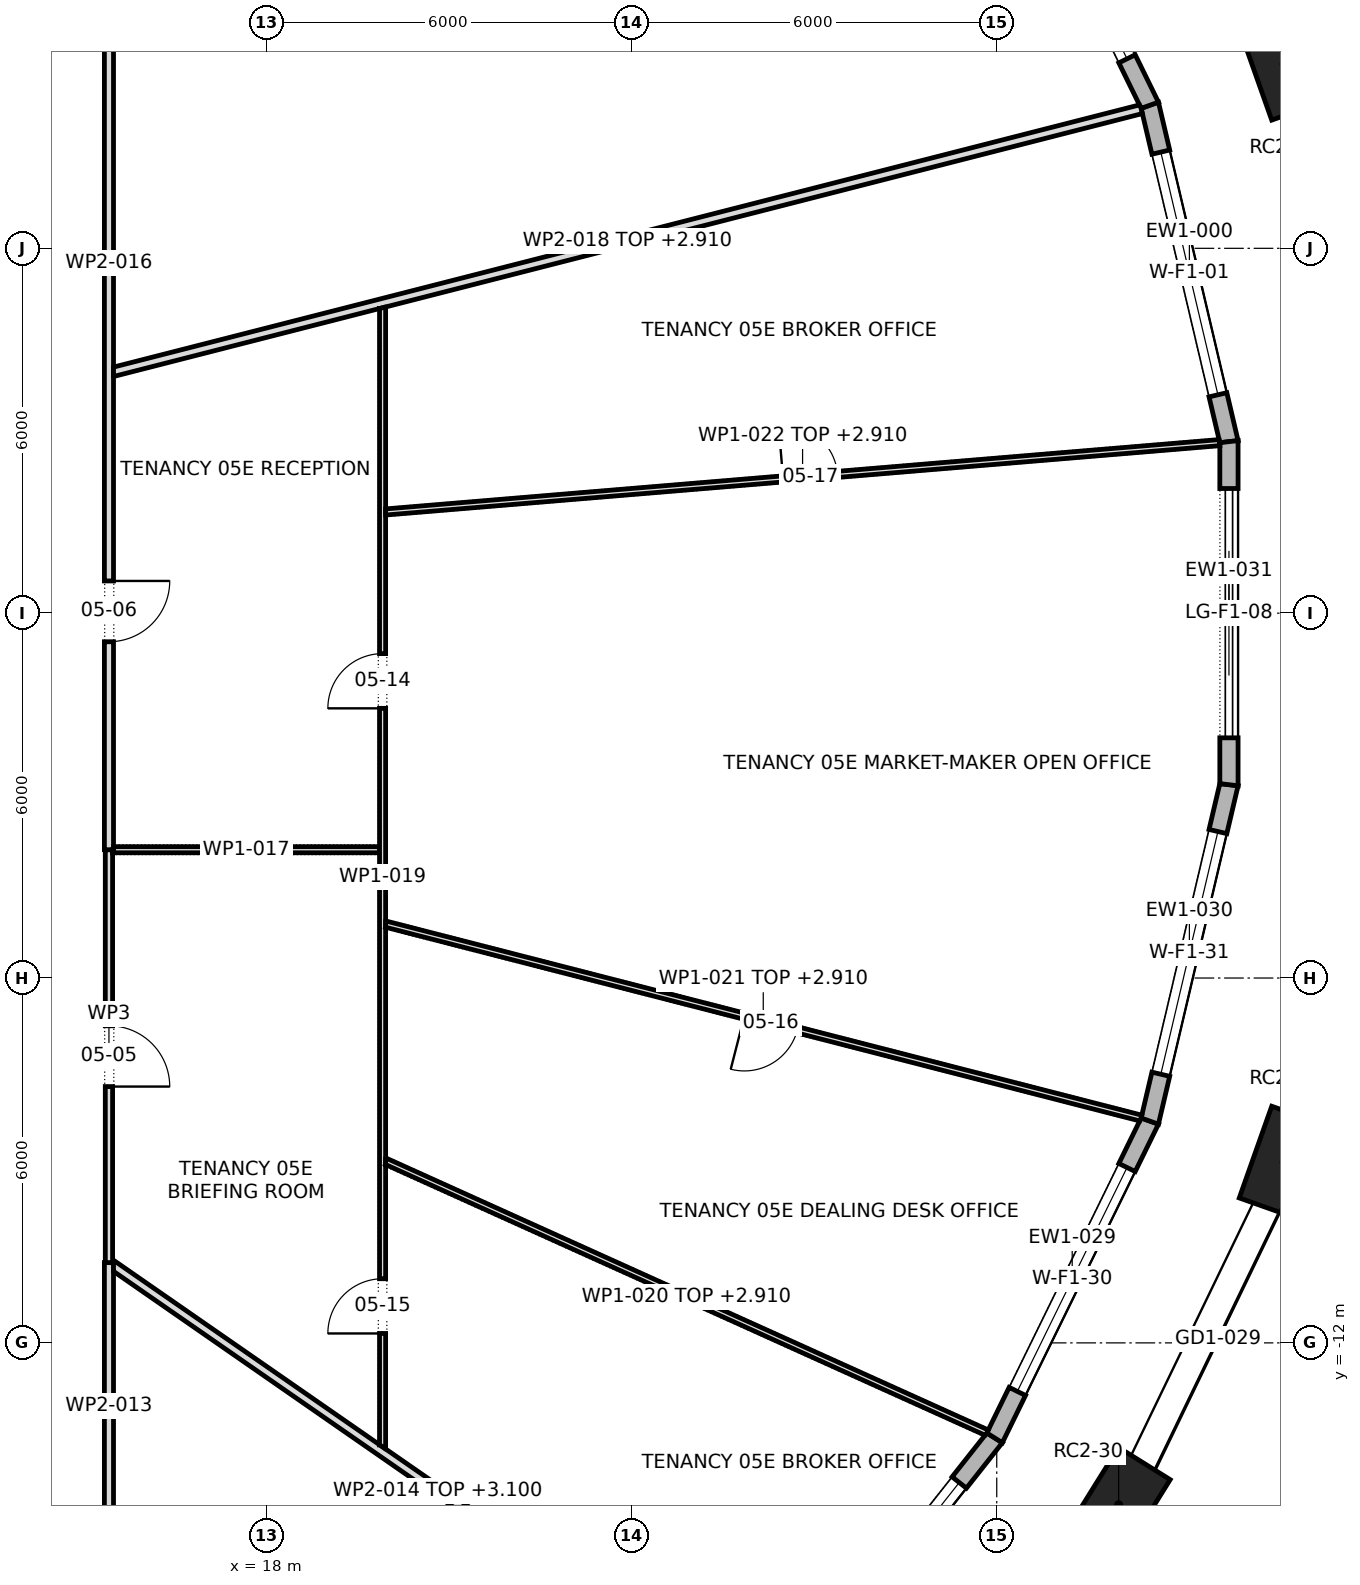
"""IFC4 building model, lengths in metres.
Left out: names, types, materials, properties, quantities, classifications, styles, units other than length and angle.
Written with IfcOpenShell. Run it as: python <this file> out.ifc"""

import sys

from ifc_helpers import new_model, si_unit, direction, frame, frame_2d, origin, origin_2d, place, context, subcontext, project, spatial, polyline, rectangle, outline, extrude, element, fill, save


model = new_model("IFC4")
c1 = context("Model", 3, precision=1e-05, world=origin(), true_north=direction((0.0, 1.0)))
c2 = subcontext(c1, "Body", "Model", "MODEL_VIEW")
j1 = project(units=[si_unit("LENGTHUNIT", "METRE"), si_unit("PLANEANGLEUNIT", "RADIAN")], contexts=[c1])
p1 = place(None, origin())
s1 = spatial("IfcSite", under=j1, at=p1, CompositionType="ELEMENT")
p2 = place(p1, origin())
s2 = spatial("IfcBuilding", under=s1, at=p2, CompositionType="ELEMENT")
p3 = place(p2, frame((0.0, 0.0, 82.3)))
s3 = spatial("IfcBuildingStorey", under=s2, at=p3, CompositionType="ELEMENT", Elevation=82.3)
for number, where, z_axis, x_axis in (
    (1, (34.727, 9.029, 0.0), (0.0, 0.0, 1.0), (-0.334, 0.943, 0.0)),
    (2, (32.004, -14.663, 0.0), (0.0, 0.0, 1.0), (0.529, 0.849, 0.0)),
    (3, (34.727, -9.029, 0.0), (0.0, 0.0, 1.0), (0.334, 0.943, 0.0)),
):
    element("IfcColumn", number, at=place(p3, frame(where, z_axis=z_axis, x_axis=x_axis)), inside=s3, PredefinedType="COLUMN", context=c2, shape_type="SweptSolid", body=[
        extrude(rectangle(XDim=1.6, YDim=1.0, at=origin_2d()), origin(), (0.0, 0.0, 1.0), 4.2),
    ])
p4 = place(p3, frame((33.819, 2.821, 0.0), z_axis=(0.0, 0.0, 1.0), x_axis=(-0.229058489262, 0.97341266095, 0.0)))
e4 = element("IfcWall", 4, at=p4, inside=s3, PredefinedType="STANDARD", context=c2, shape_type="SweptSolid", body=[
    extrude(outline(polyline([(-0.017, -0.15), (5.7, -0.15), (5.666, 0.15), (0.017, 0.15), (-0.017, -0.15)])), origin(), (0.0, 0.0, 1.0), 3.9),
])
p5 = place(p4, frame((0.792, 0.0, 0.6)))
e5 = element("IfcOpeningElement", 5, at=p5, cuts=e4, PredefinedType="OPENING", context=c2, shape_type="SweptSolid", body=[
    extrude(rectangle(XDim=4.1, YDim=2.85, at=frame_2d((2.05, 1.425))), frame((0.0, 0.162, 0.0), z_axis=(0.0, -1.0, 0.0), x_axis=(1.0, 0.0, 0.0)), (0.0, 0.0, 1.0), 0.324),
])
p6 = place(p3, frame((32.517, 8.353, 0.0), z_axis=(0.0, 0.0, 1.0), x_axis=(-0.440027465772, 0.897984314655, 0.0)))
e6 = element("IfcWall", 6, at=p6, inside=s3, PredefinedType="STANDARD", context=c2, shape_type="SweptSolid", body=[
    extrude(outline(polyline([(-0.017, -0.15), (5.817, -0.15), (5.785, 0.15), (0.017, 0.15), (-0.017, -0.15)])), origin(), (0.0, 0.0, 1.0), 3.9),
])
p7 = place(p6, frame((0.85, 0.0, 0.6)))
e7 = element("IfcOpeningElement", 7, at=p7, cuts=e6, PredefinedType="OPENING", context=c2, shape_type="SweptSolid", body=[
    extrude(rectangle(XDim=4.1, YDim=2.85, at=frame_2d((2.05, 1.425))), frame((0.0, 0.162, 0.0), z_axis=(0.0, -1.0, 0.0), x_axis=(1.0, 0.0, 0.0)), (0.0, 0.0, 1.0), 0.324),
])
p8 = place(p3, frame((26.26, -18.248, 0.0), z_axis=(0.0, 0.0, 1.0), x_axis=(0.620093447965, 0.784527957303, 0.0)))
e8 = element("IfcWall", 8, at=p8, inside=s3, PredefinedType="STANDARD", context=c2, shape_type="SweptSolid", body=[
    extrude(outline(polyline([(-0.015, -0.15), (5.989, -0.15), (5.957, 0.15), (0.015, 0.15), (-0.015, -0.15)])), origin(), (0.0, 0.0, 1.0), 3.9),
])
p9 = place(p8, frame((0.937, 0.0, 0.6)))
e9 = element("IfcOpeningElement", 9, at=p9, cuts=e8, PredefinedType="OPENING", context=c2, shape_type="SweptSolid", body=[
    extrude(rectangle(XDim=4.1, YDim=2.85, at=frame_2d((2.05, 1.425))), frame((0.0, 0.162, 0.0), z_axis=(0.0, -1.0, 0.0), x_axis=(1.0, 0.0, 0.0)), (0.0, 0.0, 1.0), 0.324),
])
p10 = place(p3, frame((29.964, -13.562, 0.0), z_axis=(0.0, 0.0, 1.0), x_axis=(0.440027465772, 0.897984314655, 0.0)))
e10 = element("IfcWall", 10, at=p10, inside=s3, PredefinedType="STANDARD", context=c2, shape_type="SweptSolid", body=[
    extrude(outline(polyline([(-0.016, -0.15), (5.818, -0.15), (5.784, 0.15), (0.016, 0.15), (-0.016, -0.15)])), origin(), (0.0, 0.0, 1.0), 3.9),
])
p11 = place(p10, frame((0.85, 0.0, 0.6)))
e11 = element("IfcOpeningElement", 11, at=p11, cuts=e10, PredefinedType="OPENING", context=c2, shape_type="SweptSolid", body=[
    extrude(rectangle(XDim=4.1, YDim=2.85, at=frame_2d((2.05, 1.425))), frame((0.0, 0.162, 0.0), z_axis=(0.0, -1.0, 0.0), x_axis=(1.0, 0.0, 0.0)), (0.0, 0.0, 1.0), 0.324),
])
p12 = place(p3, frame((32.517, -8.353, 0.0), z_axis=(0.0, 0.0, 1.0), x_axis=(0.229058489262, 0.97341266095, 0.0)))
e12 = element("IfcWall", 12, at=p12, inside=s3, PredefinedType="STANDARD", context=c2, shape_type="SweptSolid", body=[
    extrude(outline(polyline([(-0.017, -0.15), (5.7, -0.15), (5.666, 0.15), (0.017, 0.15), (-0.017, -0.15)])), origin(), (0.0, 0.0, 1.0), 3.9),
])
p13 = place(p12, frame((0.792, 0.0, 0.6)))
e13 = element("IfcOpeningElement", 13, at=p13, cuts=e12, PredefinedType="OPENING", context=c2, shape_type="SweptSolid", body=[
    extrude(rectangle(XDim=4.1, YDim=2.85, at=frame_2d((2.05, 1.425))), frame((0.0, 0.162, 0.0), z_axis=(0.0, -1.0, 0.0), x_axis=(1.0, 0.0, 0.0)), (0.0, 0.0, 1.0), 0.324),
])
p14 = place(p3, frame((33.819, -2.821, 0.0), z_axis=(0.0, 0.0, 1.0), x_axis=(0.0, 1.0, 0.0)))
e14 = element("IfcWall", 14, at=p14, inside=s3, PredefinedType="STANDARD", context=c2, shape_type="SweptSolid", body=[
    extrude(outline(polyline([(-0.017, -0.15), (5.658, -0.15), (5.624, 0.15), (0.017, 0.15), (-0.017, -0.15)])), origin(), (0.0, 0.0, 1.0), 3.9),
])
p15 = place(p14, frame((0.771, 0.0, 0.0)))
e15 = element("IfcOpeningElement", 15, at=p15, cuts=e14, PredefinedType="OPENING", context=c2, shape_type="SweptSolid", body=[
    extrude(rectangle(XDim=4.1, YDim=3.45, at=frame_2d((2.05, 1.725))), frame((0.0, 0.162, 0.0), z_axis=(0.0, -1.0, 0.0), x_axis=(1.0, 0.0, 0.0)), (0.0, 0.0, 1.0), 0.324),
])
p16 = place(p3, frame((15.4, -10.68, 0.0), z_axis=(0.0, 0.0, 1.0), x_axis=(0.0, -1.0, 0.0)))
e16 = element("IfcWall", 16, at=p16, inside=s3, PredefinedType="PARTITIONING", context=c2, shape_type="SweptSolid", body=[
    extrude(outline(polyline([(0.0, -0.075), (1.548, -0.075), (3.097, -0.075), (4.645, -0.075), (4.795, 0.075), (3.197, 0.075), (1.598, 0.075), (0.0, 0.075), (0.0, -0.075)])), origin(), (0.0, 0.0, 1.0), 3.9),
])
p17 = place(p3, frame((15.418, -10.692, 0.0), z_axis=(0.0, 0.0, 1.0), x_axis=(0.821683258501, -0.569944403166, 0.0)))
e17 = element("IfcWall", 17, at=p17, inside=s3, PredefinedType="PARTITIONING", context=c2, shape_type="SweptSolid", body=[
    extrude(outline(polyline([(13.047, 0.075), (11.122, 0.075), (9.196, 0.075), (7.271, 0.075), (5.346, 0.075), (5.343, 0.073), (5.342, 0.075), (3.562, 0.075), (1.781, 0.075), (0.0, 0.075), (0.0, 0.074), (0.028, 0.034), (0.04, 0.043), (0.122, -0.075), (1.968, -0.075), (3.815, -0.075), (5.661, -0.075), (7.508, -0.075), (9.354, -0.075), (11.2, -0.075), (13.047, -0.075), (13.047, 0.075)])), origin(), (0.0, 0.0, 1.0), 3.1),
])
p18 = place(p3, frame((15.4, -3.89, 0.0), z_axis=(0.0, 0.0, 1.0), x_axis=(0.0, -1.0, 0.0)))
e18 = element("IfcWall", 18, at=p18, inside=s3, PredefinedType="PARTITIONING", context=c2, shape_type="SweptSolid", body=[
    extrude(rectangle(XDim=6.79, YDim=0.12, at=frame_2d((3.395, 0.0))), origin(), (0.0, 0.0, 1.0), 3.9),
])
p19 = place(p18, frame((2.895, 0.0, 0.0)))
e19 = element("IfcOpeningElement", 19, at=p19, cuts=e18, PredefinedType="OPENING", context=c2, shape_type="SweptSolid", body=[
    extrude(rectangle(XDim=1.0, YDim=2.1, at=frame_2d((0.5, 1.05))), frame((0.0, 0.072, 0.0), z_axis=(0.0, -1.0, 0.0), x_axis=(1.0, 0.0, 0.0)), (0.0, 0.0, 1.0), 0.144),
])
p20 = place(p3, frame((15.4, -3.89, 0.0), z_axis=(0.0, 0.0, 1.0), x_axis=(0.0, 1.0, 0.0)))
e20 = element("IfcWall", 20, at=p20, inside=s3, PredefinedType="PARTITIONING", context=c2, shape_type="SweptSolid", body=[
    extrude(outline(polyline([(0.0, -0.075), (1.937, -0.075), (3.873, -0.075), (5.809, -0.075), (7.746, -0.075), (9.682, -0.075), (11.619, -0.075), (13.555, -0.075), (15.492, -0.075), (17.428, -0.075), (19.365, -0.075), (19.215, 0.075), (17.293, 0.075), (15.372, 0.075), (13.45, 0.075), (11.529, 0.075), (9.607, 0.075), (7.686, 0.075), (5.764, 0.075), (3.843, 0.075), (1.921, 0.075), (0.0, 0.075), (0.0, -0.075)])), origin(), (0.0, 0.0, 1.0), 3.9),
])
p21 = place(p20, frame((3.42, 0.0, 0.0)))
e21 = element("IfcOpeningElement", 21, at=p21, cuts=e20, PredefinedType="OPENING", context=c2, shape_type="SweptSolid", body=[
    extrude(rectangle(XDim=1.0, YDim=2.1, at=frame_2d((0.5, 1.05))), frame((0.0, 0.087, 0.0), z_axis=(0.0, -1.0, 0.0), x_axis=(1.0, 0.0, 0.0)), (0.0, 0.0, 1.0), 0.174),
])
p22 = place(p3, frame((15.46, -3.89, 0.0), z_axis=(0.0, 0.0, 1.0), x_axis=(1.0, 0.0, 0.0)))
e22 = element("IfcWall", 22, at=p22, inside=s3, PredefinedType="PARTITIONING", context=c2, shape_type="SweptSolid", body=[
    extrude(outline(polyline([(0.0, -0.05), (1.463, -0.05), (2.926, -0.05), (4.39, -0.05), (4.39, 0.05), (2.931, 0.05), (1.473, 0.05), (0.015, 0.05), (0.015, 0.0), (0.0, 0.0), (0.0, -0.05)])), origin(), (0.0, 0.0, 1.0), 3.9),
])
p23 = place(p3, frame((15.457, 3.965, 0.0), z_axis=(0.0, 0.0, 1.0), x_axis=(0.968864500014, 0.24759156006, 0.0)))
e23 = element("IfcWall", 23, at=p23, inside=s3, PredefinedType="PARTITIONING", context=c2, shape_type="SweptSolid", body=[
    extrude(outline(polyline([(0.0, -0.075), (1.505, -0.075), (3.01, -0.075), (4.515, -0.075), (4.515, -0.075), (4.516, -0.075), (6.365, -0.075), (8.215, -0.075), (10.064, -0.075), (11.914, -0.075), (13.764, -0.075), (15.614, -0.075), (17.463, -0.075), (17.463, 0.023), (17.452, 0.075), (15.517, 0.075), (13.582, 0.075), (11.647, 0.075), (9.713, 0.075), (7.778, 0.075), (5.843, 0.075), (3.908, 0.075), (1.973, 0.075), (0.038, 0.075), (0.0, -0.073), (0.0, -0.075)])), origin(), (0.0, 0.0, 1.0), 2.91),
])
p24 = place(p3, frame((19.9, -13.744, 0.0), z_axis=(0.0, 0.0, 1.0), x_axis=(0.0, 1.0, 0.0)))
e24 = element("IfcWall", 24, at=p24, inside=s3, PredefinedType="PARTITIONING", context=c2, shape_type="SweptSolid", body=[
    extrude(outline(polyline([(0.0, -0.05), (1.559, -0.05), (3.118, -0.05), (4.677, -0.05), (4.678, -0.048), (4.683, -0.05), (6.631, -0.05), (8.58, -0.05), (8.58, -0.048), (8.588, -0.05), (10.286, -0.05), (11.985, -0.05), (13.683, -0.05), (15.382, -0.05), (17.081, -0.05), (18.779, -0.05), (18.779, -0.048), (18.754, 0.05), (16.984, 0.05), (15.214, 0.05), (13.444, 0.05), (11.674, 0.05), (9.904, 0.05), (9.904, 0.05), (9.804, 0.05), (9.804, 0.05), (7.857, 0.05), (5.91, 0.05), (3.963, 0.05), (2.016, 0.05), (0.069, 0.05), (0.0, -0.05), (0.0, -0.05)])), origin(), (0.0, 0.0, 1.0), 3.9),
])
p25 = place(p24, frame((12.179, 0.0, 0.0)))
e25 = element("IfcOpeningElement", 25, at=p25, cuts=e24, PredefinedType="OPENING", context=c2, shape_type="SweptSolid", body=[
    extrude(rectangle(XDim=0.9, YDim=2.1, at=frame_2d((0.45, 1.05))), frame((0.0, 0.062, 0.0), z_axis=(0.0, -1.0, 0.0), x_axis=(1.0, 0.0, 0.0)), (0.0, 0.0, 1.0), 0.124),
])
p26 = place(p24, frame((1.899, 0.0, 0.0)))
e26 = element("IfcOpeningElement", 26, at=p26, cuts=e24, PredefinedType="OPENING", context=c2, shape_type="SweptSolid", body=[
    extrude(rectangle(XDim=0.9, YDim=2.1, at=frame_2d((0.45, 1.05))), frame((0.0, 0.062, 0.0), z_axis=(0.0, -1.0, 0.0), x_axis=(1.0, 0.0, 0.0)), (0.0, 0.0, 1.0), 0.124),
])
p27 = place(p3, frame((19.93, -9.003, 0.0), z_axis=(0.0, 0.0, 1.0), x_axis=(0.911407001064, -0.41150610981, 0.0)))
e27 = element("IfcWall", 27, at=p27, inside=s3, PredefinedType="PARTITIONING", context=c2, shape_type="SweptSolid", body=[
    extrude(outline(polyline([(0.045, -0.05), (1.847, -0.05), (3.65, -0.05), (5.453, -0.05), (7.255, -0.05), (9.058, -0.05), (10.861, -0.05), (10.872, -0.004), (10.874, 0.05), (9.062, 0.05), (7.249, 0.05), (5.437, 0.05), (3.625, 0.05), (1.812, 0.05), (0.0, 0.05), (0.0, 0.049), (0.045, -0.05)])), origin(), (0.0, 0.0, 1.0), 2.91),
])
p28 = place(p3, frame((19.938, -5.11, 0.0), z_axis=(0.0, 0.0, 1.0), x_axis=(0.96855855203, -0.248785713594, 0.0)))
e28 = element("IfcWall", 28, at=p28, inside=s3, PredefinedType="PARTITIONING", context=c2, shape_type="SweptSolid", body=[
    extrude(outline(polyline([(0.025, -0.05), (1.855, -0.05), (3.684, -0.05), (5.513, -0.05), (7.342, -0.05), (9.171, -0.05), (11.0, -0.05), (12.829, -0.05), (12.839, -0.005), (12.839, 0.05), (11.005, 0.05), (9.17, 0.05), (7.336, 0.05), (5.502, 0.05), (3.668, 0.05), (1.834, 0.05), (0.0, 0.05), (0.0, 0.049), (0.025, -0.05)])), origin(), (0.0, 0.0, 1.0), 2.91),
])
p29 = place(p28, frame((6.103, 0.0, 0.0)))
e29 = element("IfcOpeningElement", 29, at=p29, cuts=e28, PredefinedType="OPENING", context=c2, shape_type="SweptSolid", body=[
    extrude(rectangle(XDim=0.9, YDim=2.1, at=frame_2d((0.45, 1.05))), frame((0.0, 0.062, 0.0), z_axis=(0.0, -1.0, 0.0), x_axis=(1.0, 0.0, 0.0)), (0.0, 0.0, 1.0), 0.124),
])
p30 = place(p3, frame((19.946, 1.664, 0.0), z_axis=(0.0, 0.0, 1.0), x_axis=(0.996559566172, 0.082879617945, 0.0)))
e30 = element("IfcWall", 30, at=p30, inside=s3, PredefinedType="PARTITIONING", context=c2, shape_type="SweptSolid", body=[
    extrude(outline(polyline([(13.765, -0.05), (13.765, 0.026), (13.762, 0.05), (11.797, 0.05), (9.832, 0.05), (7.867, 0.05), (5.902, 0.05), (3.938, 0.05), (1.973, 0.05), (0.008, 0.05), (0.0, -0.045), (0.0, -0.05), (1.967, -0.05), (3.933, -0.05), (5.899, -0.05), (7.866, -0.05), (9.833, -0.05), (11.799, -0.05), (13.765, -0.05)])), origin(), (0.0, 0.0, 1.0), 2.91),
])
p31 = place(p30, frame((6.563, 0.0, 0.0)))
e31 = element("IfcOpeningElement", 31, at=p31, cuts=e30, PredefinedType="OPENING", context=c2, shape_type="SweptSolid", body=[
    extrude(rectangle(XDim=0.9, YDim=2.1, at=frame_2d((0.45, 1.05))), frame((0.0, 0.062, 0.0), z_axis=(0.0, -1.0, 0.0), x_axis=(1.0, 0.0, 0.0)), (0.0, 0.0, 1.0), 0.124),
])
p32 = place(p5, origin())
e32 = element("IfcWindow", 32, at=p32, inside=s3, PartitioningType="TRIPLE_PANEL_VERTICAL", PredefinedType="WINDOW", context=c2, shape_type="SweptSolid", body=[
    extrude(rectangle(XDim=4.1, YDim=2.85, at=frame_2d((2.05, 1.425))), frame((0.0, 0.03, 0.0), z_axis=(0.0, -1.0, 0.0), x_axis=(1.0, 0.0, 0.0)), (0.0, 0.0, 1.0), 0.06),
])
fill(e5, e32)
p33 = place(p7, origin())
e33 = element("IfcWindow", 33, at=p33, inside=s3, PartitioningType="TRIPLE_PANEL_VERTICAL", PredefinedType="WINDOW", context=c2, shape_type="SweptSolid", body=[
    extrude(rectangle(XDim=4.1, YDim=2.85, at=frame_2d((2.05, 1.425))), frame((0.0, 0.03, 0.0), z_axis=(0.0, -1.0, 0.0), x_axis=(1.0, 0.0, 0.0)), (0.0, 0.0, 1.0), 0.06),
])
fill(e7, e33)
p34 = place(p9, origin())
e34 = element("IfcWindow", 34, at=p34, inside=s3, PartitioningType="TRIPLE_PANEL_VERTICAL", PredefinedType="WINDOW", context=c2, shape_type="SweptSolid", body=[
    extrude(rectangle(XDim=4.1, YDim=2.85, at=frame_2d((2.05, 1.425))), frame((0.0, 0.03, 0.0), z_axis=(0.0, -1.0, 0.0), x_axis=(1.0, 0.0, 0.0)), (0.0, 0.0, 1.0), 0.06),
])
fill(e9, e34)
p35 = place(p11, origin())
e35 = element("IfcWindow", 35, at=p35, inside=s3, PartitioningType="TRIPLE_PANEL_VERTICAL", PredefinedType="WINDOW", context=c2, shape_type="SweptSolid", body=[
    extrude(rectangle(XDim=4.1, YDim=2.85, at=frame_2d((2.05, 1.425))), frame((0.0, 0.03, 0.0), z_axis=(0.0, -1.0, 0.0), x_axis=(1.0, 0.0, 0.0)), (0.0, 0.0, 1.0), 0.06),
])
fill(e11, e35)
p36 = place(p13, origin())
e36 = element("IfcWindow", 36, at=p36, inside=s3, PartitioningType="TRIPLE_PANEL_VERTICAL", PredefinedType="WINDOW", context=c2, shape_type="SweptSolid", body=[
    extrude(rectangle(XDim=4.1, YDim=2.85, at=frame_2d((2.05, 1.425))), frame((0.0, 0.03, 0.0), z_axis=(0.0, -1.0, 0.0), x_axis=(1.0, 0.0, 0.0)), (0.0, 0.0, 1.0), 0.06),
])
fill(e13, e36)
p37 = place(p15, origin())
e37 = element("IfcDoor", 37, at=p37, inside=s3, OperationType="DOUBLE_DOOR_SLIDING", PredefinedType="DOOR", context=c2, shape_type="SweptSolid", body=[
    extrude(rectangle(XDim=4.1, YDim=3.45, at=frame_2d((2.05, 1.725))), frame((0.0, 0.025, 0.0), z_axis=(0.0, -1.0, 0.0), x_axis=(1.0, 0.0, 0.0)), (0.0, 0.0, 1.0), 0.05),
])
fill(e15, e37)
p38 = place(p19, origin())
e38 = element("IfcDoor", 38, at=p38, inside=s3, OperationType="SINGLE_SWING_LEFT", PredefinedType="DOOR", context=c2, shape_type="SweptSolid", body=[
    extrude(rectangle(XDim=1.0, YDim=2.1, at=frame_2d((0.5, 1.05))), frame((0.0, 0.025, 0.0), z_axis=(0.0, -1.0, 0.0), x_axis=(1.0, 0.0, 0.0)), (0.0, 0.0, 1.0), 0.05),
])
fill(e19, e38)
p39 = place(p21, frame((1.0, 0.0, 0.0), z_axis=(0.0, 0.0, 1.0), x_axis=(-1.0, 0.0, 0.0)))
e39 = element("IfcDoor", 39, at=p39, inside=s3, OperationType="SINGLE_SWING_RIGHT", PredefinedType="DOOR", context=c2, shape_type="SweptSolid", body=[
    extrude(rectangle(XDim=1.0, YDim=2.1, at=frame_2d((0.5, 1.05))), frame((0.0, 0.025, 0.0), z_axis=(0.0, -1.0, 0.0), x_axis=(1.0, 0.0, 0.0)), (0.0, 0.0, 1.0), 0.05),
])
fill(e21, e39)
p40 = place(p25, origin())
e40 = element("IfcDoor", 40, at=p40, inside=s3, OperationType="SINGLE_SWING_RIGHT", PredefinedType="DOOR", context=c2, shape_type="SweptSolid", body=[
    extrude(rectangle(XDim=0.9, YDim=2.1, at=frame_2d((0.45, 1.05))), frame((0.0, 0.025, 0.0), z_axis=(0.0, -1.0, 0.0), x_axis=(1.0, 0.0, 0.0)), (0.0, 0.0, 1.0), 0.05),
])
fill(e25, e40)
p41 = place(p26, origin())
e41 = element("IfcDoor", 41, at=p41, inside=s3, OperationType="SINGLE_SWING_RIGHT", PredefinedType="DOOR", context=c2, shape_type="SweptSolid", body=[
    extrude(rectangle(XDim=0.9, YDim=2.1, at=frame_2d((0.45, 1.05))), frame((0.0, 0.025, 0.0), z_axis=(0.0, -1.0, 0.0), x_axis=(1.0, 0.0, 0.0)), (0.0, 0.0, 1.0), 0.05),
])
fill(e26, e41)
p42 = place(p29, frame((0.9, 0.0, 0.0), z_axis=(0.0, 0.0, 1.0), x_axis=(-1.0, 0.0, 0.0)))
e42 = element("IfcDoor", 42, at=p42, inside=s3, OperationType="SINGLE_SWING_LEFT", PredefinedType="DOOR", context=c2, shape_type="SweptSolid", body=[
    extrude(rectangle(XDim=0.9, YDim=2.1, at=frame_2d((0.45, 1.05))), frame((0.0, 0.025, 0.0), z_axis=(0.0, -1.0, 0.0), x_axis=(1.0, 0.0, 0.0)), (0.0, 0.0, 1.0), 0.05),
])
fill(e29, e42)
p43 = place(p31, origin())
e43 = element("IfcDoor", 43, at=p43, inside=s3, OperationType="SINGLE_SWING_RIGHT", PredefinedType="DOOR", context=c2, shape_type="SweptSolid", body=[
    extrude(rectangle(XDim=0.9, YDim=2.1, at=frame_2d((0.45, 1.05))), frame((0.0, 0.025, 0.0), z_axis=(0.0, -1.0, 0.0), x_axis=(1.0, 0.0, 0.0)), (0.0, 0.0, 1.0), 0.05),
])
fill(e31, e43)
save(model, sys.argv[1])
